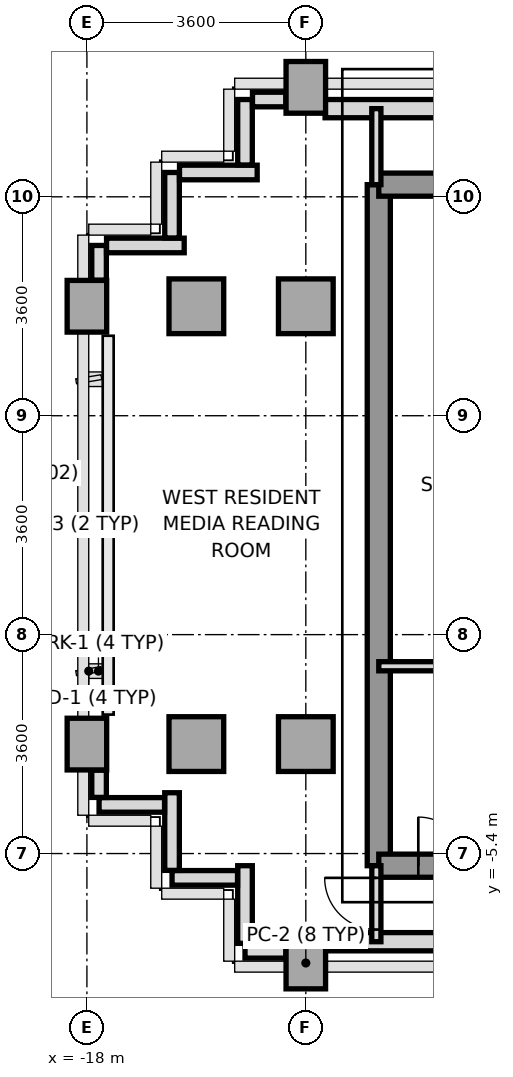
"""IFC4 building model, lengths in metres.
Left out: names, types, materials, properties, quantities, classifications, styles, units other than length and angle.
Written with IfcOpenShell. Run it as: python <this file> out.ifc"""

import sys

from ifc_helpers import new_model, si_unit, direction, frame, frame_2d, origin, origin_2d, place, context, subcontext, project, spatial, rectangle, extrude, source, transform, mapped, element, fill, save


model = new_model("IFC4")
c1 = context("Model", 3, precision=1e-05, world=origin(), true_north=direction((0.0, 1.0)))
c2 = subcontext(c1, "Body", "Model", "MODEL_VIEW")
j1 = project(units=[si_unit("LENGTHUNIT", "METRE"), si_unit("PLANEANGLEUNIT", "RADIAN")], contexts=[c1])
p1 = place(None, origin())
s1 = spatial("IfcSite", under=j1, at=p1, CompositionType="ELEMENT")
p2 = place(p1, origin())
s2 = spatial("IfcBuilding", under=s1, at=p2, CompositionType="ELEMENT")
p3 = place(p2, frame((0.0, 0.0, 211.4)))
s3 = spatial("IfcBuildingStorey", under=s2, at=p3, CompositionType="ELEMENT", Elevation=211.4)
m1 = source(origin(), c2, "Body", "SweptSolid", [
    extrude(rectangle(XDim=0.65, YDim=0.85, at=origin_2d()), origin(), (0.0, 0.0, 1.0), 3.14),
])
for number, where, z_axis, x_axis in (
    (1, (-18.0, -3.6, 0.0), (0.0, 0.0, 1.0), (1.0, 0.0, 0.0)),
    (2, (-18.0, 3.6, 0.0), (0.0, 0.0, 1.0), (1.0, 0.0, 0.0)),
):
    element("IfcColumn", number, at=place(p3, frame(where, z_axis=z_axis, x_axis=x_axis)), inside=s3, PredefinedType="COLUMN", context=c2, shape_type="MappedRepresentation", body=[
        mapped(m1, transform((0.0, 0.0, 0.0), x_axis=(1.0, 0.0, 0.0), y_axis=(0.0, 1.0, 0.0), z_axis=(0.0, 0.0, 1.0), scale=1.0)),
    ])
m2 = source(origin(), c2, "Body", "SweptSolid", [
    extrude(rectangle(XDim=0.9, YDim=0.9, at=origin_2d()), origin(), (0.0, 0.0, 1.0), 3.14),
])
for number, where, z_axis, x_axis in (
    (3, (-16.2, -3.6, 0.0), (0.0, 0.0, 1.0), (1.0, 0.0, 0.0)),
    (4, (-16.2, 3.6, 0.0), (0.0, 0.0, 1.0), (1.0, 0.0, 0.0)),
):
    element("IfcColumn", number, at=place(p3, frame(where, z_axis=z_axis, x_axis=x_axis)), inside=s3, PredefinedType="COLUMN", context=c2, shape_type="MappedRepresentation", body=[
        mapped(m2, transform((0.0, 0.0, 0.0), x_axis=(1.0, 0.0, 0.0), y_axis=(0.0, 1.0, 0.0), z_axis=(0.0, 0.0, 1.0), scale=1.0)),
    ])
p4 = place(p3, frame((-14.4, -7.2, 0.0), z_axis=(0.0, 0.0, 1.0), x_axis=(1.0, 0.0, 0.0)))
e5 = element("IfcColumn", 5, at=p4, inside=s3, PredefinedType="COLUMN", context=c2, shape_type="MappedRepresentation", body=[
    mapped(m1, transform((0.0, 0.0, 0.0), x_axis=(1.0, 0.0, 0.0), y_axis=(0.0, 1.0, 0.0), z_axis=(0.0, 0.0, 1.0), scale=1.0)),
])
for number, where, z_axis, x_axis in (
    (6, (-14.4, -3.6, 0.0), (0.0, 0.0, 1.0), (1.0, 0.0, 0.0)),
    (7, (-14.4, 3.6, 0.0), (0.0, 0.0, 1.0), (1.0, 0.0, 0.0)),
):
    element("IfcColumn", number, at=place(p3, frame(where, z_axis=z_axis, x_axis=x_axis)), inside=s3, PredefinedType="COLUMN", context=c2, shape_type="MappedRepresentation", body=[
        mapped(m2, transform((0.0, 0.0, 0.0), x_axis=(1.0, 0.0, 0.0), y_axis=(0.0, 1.0, 0.0), z_axis=(0.0, 0.0, 1.0), scale=1.0)),
    ])
p5 = place(p3, frame((-14.4, 7.2, 0.0), z_axis=(0.0, 0.0, 1.0), x_axis=(1.0, 0.0, 0.0)))
e8 = element("IfcColumn", 8, at=p5, inside=s3, PredefinedType="COLUMN", context=c2, shape_type="MappedRepresentation", body=[
    mapped(m1, transform((0.0, 0.0, 0.0), x_axis=(1.0, 0.0, 0.0), y_axis=(0.0, 1.0, 0.0), z_axis=(0.0, 0.0, 1.0), scale=1.0)),
])
p6 = place(p3, frame((-14.083, 6.85, 0.0), z_axis=(0.0, 0.0, 1.0), x_axis=(1.0, 0.0, 0.0)))
e9 = element("IfcWall", 9, at=p6, inside=s3, PredefinedType="SOLIDWALL", context=c2, shape_type="SweptSolid", body=[
    extrude(rectangle(XDim=2.635, YDim=0.3, at=frame_2d((1.317, 0.0))), origin(), (0.0, 0.0, 1.0), 3.14),
])
p7 = place(p3, frame((-14.083, -6.85, 0.0), z_axis=(0.0, 0.0, 1.0), x_axis=(1.0, 0.0, 0.0)))
e10 = element("IfcWall", 10, at=p7, inside=s3, PredefinedType="SOLIDWALL", context=c2, shape_type="SweptSolid", body=[
    extrude(rectangle(XDim=2.333, YDim=0.3, at=frame_2d((1.167, 0.0))), origin(), (0.0, 0.0, 1.0), 3.14),
])
p8 = place(p3, frame((-14.728, -7.0, 0.0), z_axis=(0.0, 0.0, 1.0), x_axis=(-1.0, 0.0, 0.0)))
e11 = element("IfcWall", 11, at=p8, inside=s3, PredefinedType="PARAPET", context=c2, shape_type="SweptSolid", body=[
    extrude(rectangle(XDim=0.672, YDim=0.24, at=frame_2d((0.336, 0.0))), origin(), (0.0, 0.0, 1.0), 1.15),
])
p9 = place(p3, frame((-15.4, -6.877, 0.0), z_axis=(0.0, 0.0, 1.0), x_axis=(0.0, 1.0, 0.0)))
e12 = element("IfcWall", 12, at=p9, inside=s3, PredefinedType="PARAPET", context=c2, shape_type="SweptSolid", body=[
    extrude(rectangle(XDim=1.277, YDim=0.24, at=frame_2d((0.638, 0.0))), origin(), (0.0, 0.0, 1.0), 1.15),
])
p10 = place(p3, frame((-15.523, -5.8, 0.0), z_axis=(0.0, 0.0, 1.0), x_axis=(-1.0, 0.0, 0.0)))
e13 = element("IfcWall", 13, at=p10, inside=s3, PredefinedType="PARAPET", context=c2, shape_type="SweptSolid", body=[
    extrude(rectangle(XDim=1.077, YDim=0.24, at=frame_2d((0.539, 0.0))), origin(), (0.0, 0.0, 1.0), 1.15),
])
p11 = place(p3, frame((-16.6, -5.677, 0.0), z_axis=(0.0, 0.0, 1.0), x_axis=(0.0, 1.0, 0.0)))
e14 = element("IfcWall", 14, at=p11, inside=s3, PredefinedType="PARAPET", context=c2, shape_type="SweptSolid", body=[
    extrude(rectangle(XDim=1.277, YDim=0.24, at=frame_2d((0.639, 0.0))), origin(), (0.0, 0.0, 1.0), 1.15),
])
p12 = place(p3, frame((-16.723, -4.6, 0.0), z_axis=(0.0, 0.0, 1.0), x_axis=(-1.0, 0.0, 0.0)))
e15 = element("IfcWall", 15, at=p12, inside=s3, PredefinedType="PARAPET", context=c2, shape_type="SweptSolid", body=[
    extrude(rectangle(XDim=1.077, YDim=0.24, at=frame_2d((0.539, 0.0))), origin(), (0.0, 0.0, 1.0), 1.15),
])
p13 = place(p3, frame((-17.8, -4.477, 0.0), z_axis=(0.0, 0.0, 1.0), x_axis=(0.0, 1.0, 0.0)))
e16 = element("IfcWall", 16, at=p13, inside=s3, PredefinedType="PARAPET", context=c2, shape_type="SweptSolid", body=[
    extrude(rectangle(XDim=0.449, YDim=0.24, at=frame_2d((0.225, 0.0))), origin(), (0.0, 0.0, 1.0), 1.15),
])
p14 = place(p3, frame((-17.8, 4.028, 0.0), z_axis=(0.0, 0.0, 1.0), x_axis=(0.0, 1.0, 0.0)))
e17 = element("IfcWall", 17, at=p14, inside=s3, PredefinedType="PARAPET", context=c2, shape_type="SweptSolid", body=[
    extrude(rectangle(XDim=0.572, YDim=0.24, at=frame_2d((0.286, 0.0))), origin(), (0.0, 0.0, 1.0), 1.15),
])
p15 = place(p3, frame((-17.677, 4.6, 0.0), z_axis=(0.0, 0.0, 1.0), x_axis=(1.0, 0.0, 0.0)))
e18 = element("IfcWall", 18, at=p15, inside=s3, PredefinedType="PARAPET", context=c2, shape_type="SweptSolid", body=[
    extrude(rectangle(XDim=1.277, YDim=0.24, at=frame_2d((0.639, 0.0))), origin(), (0.0, 0.0, 1.0), 1.15),
])
p16 = place(p3, frame((-16.6, 4.723, 0.0), z_axis=(0.0, 0.0, 1.0), x_axis=(0.0, 1.0, 0.0)))
e19 = element("IfcWall", 19, at=p16, inside=s3, PredefinedType="PARAPET", context=c2, shape_type="SweptSolid", body=[
    extrude(rectangle(XDim=1.077, YDim=0.24, at=frame_2d((0.539, 0.0))), origin(), (0.0, 0.0, 1.0), 1.15),
])
p17 = place(p3, frame((-16.477, 5.8, 0.0), z_axis=(0.0, 0.0, 1.0), x_axis=(1.0, 0.0, 0.0)))
e20 = element("IfcWall", 20, at=p17, inside=s3, PredefinedType="PARAPET", context=c2, shape_type="SweptSolid", body=[
    extrude(rectangle(XDim=1.277, YDim=0.24, at=frame_2d((0.639, 0.0))), origin(), (0.0, 0.0, 1.0), 1.15),
])
p18 = place(p3, frame((-15.4, 5.923, 0.0), z_axis=(0.0, 0.0, 1.0), x_axis=(0.0, 1.0, 0.0)))
e21 = element("IfcWall", 21, at=p18, inside=s3, PredefinedType="PARAPET", context=c2, shape_type="SweptSolid", body=[
    extrude(rectangle(XDim=1.077, YDim=0.24, at=frame_2d((0.539, 0.0))), origin(), (0.0, 0.0, 1.0), 1.15),
])
p19 = place(p3, frame((-15.277, 7.0, 0.0), z_axis=(0.0, 0.0, 1.0), x_axis=(1.0, 0.0, 0.0)))
e22 = element("IfcWall", 22, at=p19, inside=s3, PredefinedType="PARAPET", context=c2, shape_type="SweptSolid", body=[
    extrude(rectangle(XDim=0.549, YDim=0.24, at=frame_2d((0.274, 0.0))), origin(), (0.0, 0.0, 1.0), 1.15),
])
p20 = place(p3, frame((-13.2, -5.6, 0.0), z_axis=(0.0, 0.0, 1.0), x_axis=(0.0, 1.0, 0.0)))
e23 = element("IfcWall", 23, at=p20, inside=s3, PredefinedType="SHEAR", context=c2, shape_type="SweptSolid", body=[
    extrude(rectangle(XDim=11.2, YDim=0.38, at=frame_2d((5.6, 0.0))), origin(), (0.0, 0.0, 1.0), 3.14),
])
p21 = place(p3, frame((-13.2, 5.6, 0.0), z_axis=(0.0, 0.0, 1.0), x_axis=(1.0, 0.0, 0.0)))
e24 = element("IfcWall", 24, at=p21, inside=s3, PredefinedType="SHEAR", context=c2, shape_type="SweptSolid", body=[
    extrude(rectangle(XDim=1.844, YDim=0.38, at=frame_2d((0.922, 0.0))), origin(), (0.0, 0.0, 1.0), 3.14),
])
p22 = place(p3, frame((-13.2, -5.6, 0.0), z_axis=(0.0, 0.0, 1.0), x_axis=(1.0, 0.0, 0.0)))
e25 = element("IfcWall", 25, at=p22, inside=s3, PredefinedType="SHEAR", context=c2, shape_type="SweptSolid", body=[
    extrude(rectangle(XDim=7.8, YDim=0.38, at=frame_2d((3.9, 0.0))), origin(), (0.0, 0.0, 1.0), 3.14),
])
p23 = place(p22, frame((0.65, 0.0, 0.0)))
e26 = element("IfcOpeningElement", 26, at=p23, cuts=e25, PredefinedType="OPENING", context=c2, shape_type="SweptSolid", body=[
    extrude(rectangle(XDim=0.8, YDim=2.1, at=frame_2d((0.4, 1.05))), frame((0.0, 0.2, 0.0), z_axis=(0.0, -1.0, 0.0), x_axis=(1.0, 0.0, 0.0)), (0.0, 0.0, 1.0), 0.4),
])
p24 = place(p22, frame((4.2, 0.0, 0.0)))
e27 = element("IfcOpeningElement", 27, at=p24, cuts=e25, PredefinedType="OPENING", context=c2, shape_type="SweptSolid", body=[
    extrude(rectangle(XDim=0.95, YDim=2.15, at=frame_2d((0.475, 1.075))), frame((0.0, 0.2, 0.0), z_axis=(0.0, -1.0, 0.0), x_axis=(1.0, 0.0, 0.0)), (0.0, 0.0, 1.0), 0.4),
])
p25 = place(p3, frame((-13.2, -2.32, 0.0), z_axis=(0.0, 0.0, 1.0), x_axis=(1.0, 0.0, 0.0)))
e28 = element("IfcWall", 28, at=p25, inside=s3, PredefinedType="PARTITIONING", context=c2, shape_type="SweptSolid", body=[
    extrude(rectangle(XDim=2.18, YDim=0.15, at=frame_2d((1.09, 0.0))), origin(), (0.0, 0.0, 1.0), 3.14),
])
p26 = place(p3, frame((-13.24, 5.6, 0.0), z_axis=(0.0, 0.0, 1.0), x_axis=(0.0, 1.0, 0.0)))
e29 = element("IfcWall", 29, at=p26, inside=s3, PredefinedType="PARTITIONING", context=c2, shape_type="SweptSolid", body=[
    extrude(rectangle(XDim=1.25, YDim=0.15, at=frame_2d((0.625, 0.0))), origin(), (0.0, 0.0, 1.0), 3.14),
])
p27 = place(p3, frame((-13.24, -6.85, 0.0), z_axis=(0.0, 0.0, 1.0), x_axis=(0.0, 1.0, 0.0)))
e30 = element("IfcWall", 30, at=p27, inside=s3, PredefinedType="PARTITIONING", context=c2, shape_type="SweptSolid", body=[
    extrude(rectangle(XDim=1.25, YDim=0.15, at=frame_2d((0.625, 0.0))), origin(), (0.0, 0.0, 1.0), 3.14),
])
p28 = place(p27, frame((0.2, 0.0, 0.0)))
e31 = element("IfcOpeningElement", 31, at=p28, cuts=e30, PredefinedType="OPENING", context=c2, shape_type="SweptSolid", body=[
    extrude(rectangle(XDim=0.85, YDim=2.1, at=frame_2d((0.425, 1.05))), frame((0.0, 0.085, 0.0), z_axis=(0.0, -1.0, 0.0), x_axis=(1.0, 0.0, 0.0)), (0.0, 0.0, 1.0), 0.17),
])
m3 = source(origin(), c2, "Body", "SweptSolid", [
    extrude(rectangle(XDim=0.8, YDim=2.1, at=frame_2d((0.4, 1.05))), frame((0.0, 0.025, 0.0), z_axis=(0.0, -1.0, 0.0), x_axis=(1.0, 0.0, 0.0)), (0.0, 0.0, 1.0), 0.05),
])
p29 = place(p23, origin())
e32 = element("IfcDoor", 32, at=p29, inside=s3, OperationType="SINGLE_SWING_LEFT", PredefinedType="DOOR", context=c2, shape_type="MappedRepresentation", body=[
    mapped(m3, transform((0.0, 0.0, 0.0), x_axis=(1.0, 0.0, 0.0), y_axis=(0.0, 1.0, 0.0), z_axis=(0.0, 0.0, 1.0), scale=1.0)),
])
fill(e26, e32)
m4 = source(origin(), c2, "Body", "SweptSolid", [
    extrude(rectangle(XDim=0.85, YDim=2.1, at=frame_2d((0.425, 1.05))), frame((0.0, 0.025, 0.0), z_axis=(0.0, -1.0, 0.0), x_axis=(1.0, 0.0, 0.0)), (0.0, 0.0, 1.0), 0.05),
])
p30 = place(p28, origin())
e33 = element("IfcDoor", 33, at=p30, inside=s3, OperationType="SINGLE_SWING_RIGHT", PredefinedType="DOOR", context=c2, shape_type="MappedRepresentation", body=[
    mapped(m4, transform((0.0, 0.0, 0.0), x_axis=(1.0, 0.0, 0.0), y_axis=(0.0, 1.0, 0.0), z_axis=(0.0, 0.0, 1.0), scale=1.0)),
])
fill(e31, e33)
save(model, sys.argv[1])
